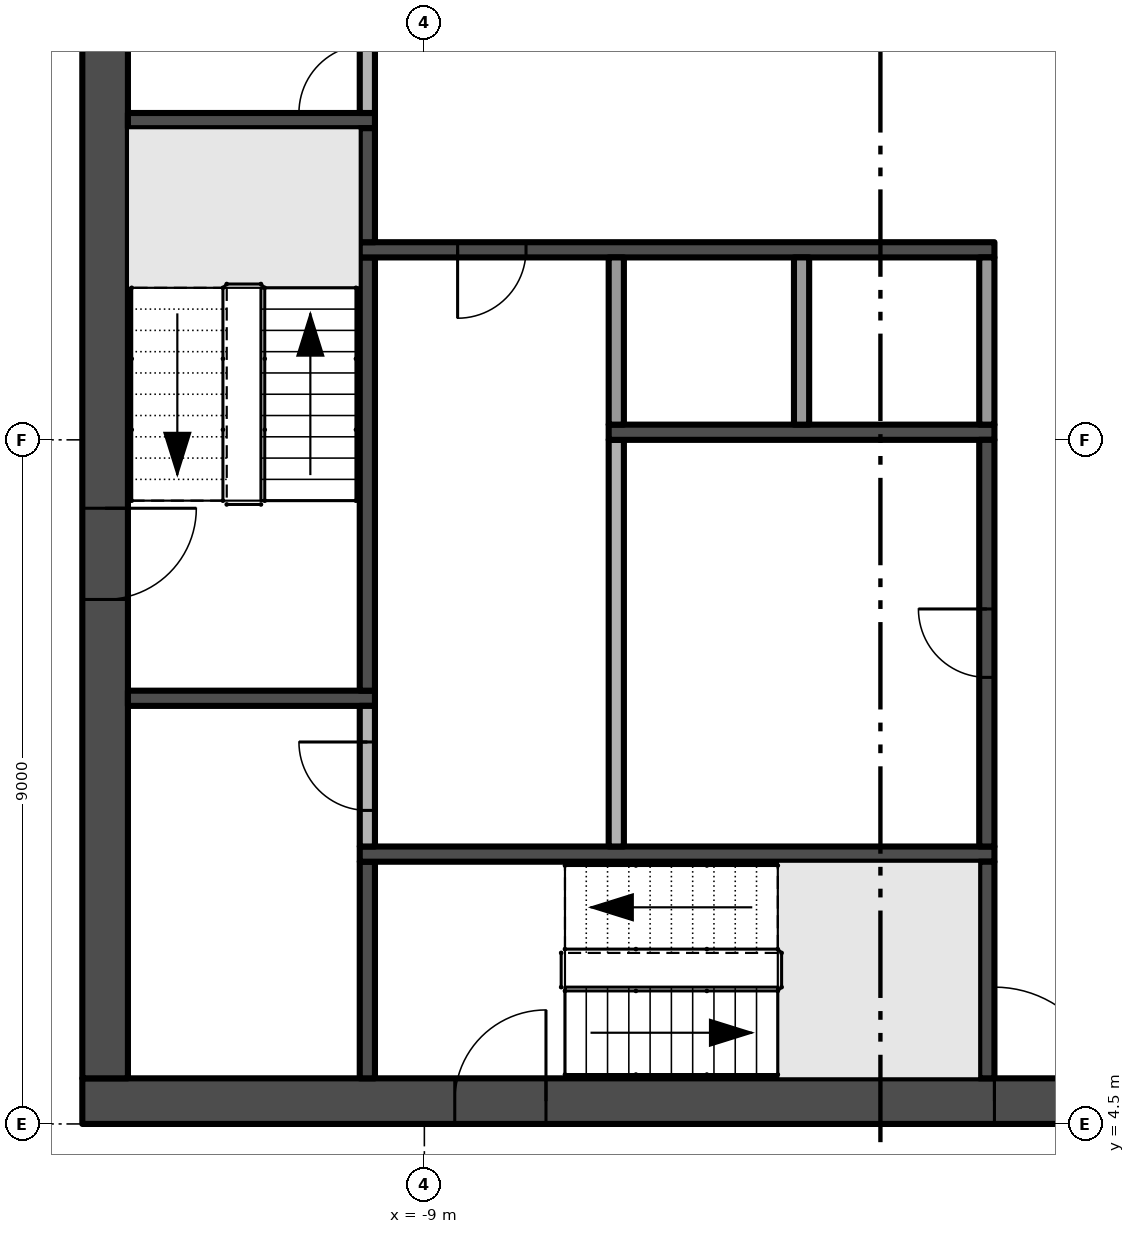
"""IFC4 building model, lengths in metres.
Left out: names, types, materials, properties, quantities, classifications, styles, units other than length and angle.
Written with IfcOpenShell. Run it as: python <this file> out.ifc"""

import sys

from ifc_helpers import new_model, si_unit, direction, frame, frame_2d, origin, place, context, subcontext, project, spatial, rectangle, extrude, element, fill, save


model = new_model("IFC4")
c1 = context("Model", 3, precision=1e-05, world=origin(), true_north=direction((0.0, 1.0)))
c2 = subcontext(c1, "Body", "Model", "MODEL_VIEW")
j1 = project(units=[si_unit("LENGTHUNIT", "METRE"), si_unit("PLANEANGLEUNIT", "RADIAN")], contexts=[c1])
p1 = place(None, origin())
s1 = spatial("IfcSite", under=j1, at=p1, CompositionType="ELEMENT")
p2 = place(p1, origin())
s2 = spatial("IfcBuilding", under=s1, at=p2, CompositionType="ELEMENT")
p3 = place(p2, frame((0.0, 0.0, 222.4)))
s3 = spatial("IfcBuildingStorey", under=s2, at=p3, CompositionType="ELEMENT", Elevation=222.4)
p4 = place(p3, frame((-13.5, 4.8, -0.3), z_axis=(0.0, 0.0, 1.0), x_axis=(1.0, 0.0, 0.0)))
e1 = element("IfcWall", 1, at=p4, inside=s3, PredefinedType="SHEAR", context=c2, shape_type="SweptSolid", body=[
    extrude(rectangle(XDim=27.0, YDim=0.6, at=frame_2d((13.5, 0.0))), origin(), (0.0, 0.0, 1.0), 3.8),
])
p5 = place(p4, frame((12.0, 0.0, 0.3)))
e2 = element("IfcOpeningElement", 2, at=p5, cuts=e1, PredefinedType="OPENING", context=c2, shape_type="SweptSolid", body=[
    extrude(rectangle(XDim=3.0, YDim=2.4, at=frame_2d((1.5, 1.2))), frame((0.0, 0.31, 0.0), z_axis=(0.0, -1.0, 0.0), x_axis=(1.0, 0.0, 0.0)), (0.0, 0.0, 1.0), 0.62),
])
p6 = place(p4, frame((4.9, 0.0, 0.3)))
e3 = element("IfcOpeningElement", 3, at=p6, cuts=e1, PredefinedType="OPENING", context=c2, shape_type="SweptSolid", body=[
    extrude(rectangle(XDim=1.2, YDim=2.2, at=frame_2d((0.6, 1.1))), frame((0.0, 0.31, 0.0), z_axis=(0.0, -1.0, 0.0), x_axis=(1.0, 0.0, 0.0)), (0.0, 0.0, 1.0), 0.62),
])
p7 = place(p4, frame((20.75, 0.0, 0.3)))
e4 = element("IfcOpeningElement", 4, at=p7, cuts=e1, PredefinedType="OPENING", context=c2, shape_type="SweptSolid", body=[
    extrude(rectangle(XDim=1.5, YDim=2.2, at=frame_2d((0.75, 1.1))), frame((0.0, 0.31, 0.0), z_axis=(0.0, -1.0, 0.0), x_axis=(1.0, 0.0, 0.0)), (0.0, 0.0, 1.0), 0.62),
])
p8 = place(p4, frame((17.4, 0.0, 0.3)))
e5 = element("IfcOpeningElement", 5, at=p8, cuts=e1, PredefinedType="OPENING", context=c2, shape_type="SweptSolid", body=[
    extrude(rectangle(XDim=1.2, YDim=2.2, at=frame_2d((0.6, 1.1))), frame((0.0, 0.31, 0.0), z_axis=(0.0, -1.0, 0.0), x_axis=(1.0, 0.0, 0.0)), (0.0, 0.0, 1.0), 0.62),
])
p9 = place(p3, frame((-13.2, 21.9, -0.3), z_axis=(0.0, 0.0, 1.0), x_axis=(0.0, -1.0, 0.0)))
e6 = element("IfcWall", 6, at=p9, inside=s3, PredefinedType="SHEAR", context=c2, shape_type="SweptSolid", body=[
    extrude(rectangle(XDim=16.8, YDim=0.6, at=frame_2d((8.4, 0.0))), origin(), (0.0, 0.0, 1.0), 3.8),
])
p10 = place(p9, frame((9.3, 0.0, 0.3)))
e7 = element("IfcOpeningElement", 7, at=p10, cuts=e6, PredefinedType="OPENING", context=c2, shape_type="SweptSolid", body=[
    extrude(rectangle(XDim=1.2, YDim=2.2, at=frame_2d((0.6, 1.1))), frame((0.0, 0.31, 0.0), z_axis=(0.0, -1.0, 0.0), x_axis=(1.0, 0.0, 0.0)), (0.0, 0.0, 1.0), 0.62),
])
for number, where, z_axis, x_axis in (
    (8, (-12.9, 10.1, 0.0), (0.0, 0.0, 1.0), (1.0, 0.0, 0.0)),
    (9, (-12.9, 17.7, 0.0), (0.0, 0.0, 1.0), (1.0, 0.0, 0.0)),
):
    element("IfcWall", number, at=place(p3, frame(where, z_axis=z_axis, x_axis=x_axis)), inside=s3, PredefinedType="SHEAR", context=c2, shape_type="SweptSolid", body=[
        extrude(rectangle(XDim=3.25, YDim=0.2, at=frame_2d((1.625, 0.0))), origin(), (0.0, 0.0, 1.0), 3.5),
    ])
p11 = place(p3, frame((-9.75, 5.1, 0.0), z_axis=(0.0, 0.0, 1.0), x_axis=(0.0, 1.0, 0.0)))
e10 = element("IfcWall", 10, at=p11, inside=s3, PredefinedType="SHEAR", context=c2, shape_type="SweptSolid", body=[
    extrude(rectangle(XDim=2.85, YDim=0.2, at=frame_2d((1.425, 0.0))), origin(), (0.0, 0.0, 1.0), 3.5),
])
p12 = place(p3, frame((-9.85, 8.05, 0.0), z_axis=(0.0, 0.0, 1.0), x_axis=(1.0, 0.0, 0.0)))
e11 = element("IfcWall", 11, at=p12, inside=s3, PredefinedType="SHEAR", context=c2, shape_type="SweptSolid", body=[
    extrude(rectangle(XDim=8.35, YDim=0.2, at=frame_2d((4.175, 0.0))), origin(), (0.0, 0.0, 1.0), 3.5),
])
p13 = place(p3, frame((-9.75, 8.15, 0.0), z_axis=(0.0, 0.0, 1.0), x_axis=(0.0, 1.0, 0.0)))
e12 = element("IfcWall", 12, at=p13, inside=s3, PredefinedType="PARTITIONING", context=c2, shape_type="SweptSolid", body=[
    extrude(rectangle(XDim=1.85, YDim=0.2, at=frame_2d((0.925, 0.0))), origin(), (0.0, 0.0, 1.0), 3.5),
])
p14 = place(p13, frame((0.475, 0.0, 0.0)))
e13 = element("IfcOpeningElement", 13, at=p14, cuts=e12, PredefinedType="OPENING", context=c2, shape_type="SweptSolid", body=[
    extrude(rectangle(XDim=0.9, YDim=2.1, at=frame_2d((0.45, 1.05))), frame((0.0, 0.11, 0.0), z_axis=(0.0, -1.0, 0.0), x_axis=(1.0, 0.0, 0.0)), (0.0, 0.0, 1.0), 0.22),
])
p15 = place(p3, frame((-9.75, 10.2, 0.0), z_axis=(0.0, 0.0, 1.0), x_axis=(0.0, 1.0, 0.0)))
e14 = element("IfcWall", 14, at=p15, inside=s3, PredefinedType="SHEAR", context=c2, shape_type="SweptSolid", body=[
    extrude(rectangle(XDim=5.7, YDim=0.2, at=frame_2d((2.85, 0.0))), origin(), (0.0, 0.0, 1.0), 3.5),
])
p16 = place(p3, frame((-1.5, 16.0, 0.0), z_axis=(0.0, 0.0, 1.0), x_axis=(-1.0, 0.0, 0.0)))
e15 = element("IfcWall", 15, at=p16, inside=s3, PredefinedType="SHEAR", context=c2, shape_type="SweptSolid", body=[
    extrude(rectangle(XDim=8.35, YDim=0.2, at=frame_2d((4.175, 0.0))), origin(), (0.0, 0.0, 1.0), 3.5),
])
p17 = place(p16, frame((6.162, 0.0, 0.0)))
e16 = element("IfcOpeningElement", 16, at=p17, cuts=e15, PredefinedType="OPENING", context=c2, shape_type="SweptSolid", body=[
    extrude(rectangle(XDim=0.9, YDim=2.1, at=frame_2d((0.45, 1.05))), frame((0.0, 0.11, 0.0), z_axis=(0.0, -1.0, 0.0), x_axis=(1.0, 0.0, 0.0)), (0.0, 0.0, 1.0), 0.22),
])
p18 = place(p3, frame((-9.75, 16.1, 0.0), z_axis=(0.0, 0.0, 1.0), x_axis=(0.0, 1.0, 0.0)))
e17 = element("IfcWall", 17, at=p18, inside=s3, PredefinedType="SHEAR", context=c2, shape_type="SweptSolid", body=[
    extrude(rectangle(XDim=1.5, YDim=0.2, at=frame_2d((0.75, 0.0))), origin(), (0.0, 0.0, 1.0), 3.5),
])
p19 = place(p3, frame((-9.75, 17.8, 0.0), z_axis=(0.0, 0.0, 1.0), x_axis=(0.0, 1.0, 0.0)))
e18 = element("IfcWall", 18, at=p19, inside=s3, PredefinedType="PARTITIONING", context=c2, shape_type="SweptSolid", body=[
    extrude(rectangle(XDim=1.4, YDim=0.2, at=frame_2d((0.7, 0.0))), origin(), (0.0, 0.0, 1.0), 3.5),
])
p20 = place(p19, origin())
e19 = element("IfcOpeningElement", 19, at=p20, cuts=e18, PredefinedType="OPENING", context=c2, shape_type="SweptSolid", body=[
    extrude(rectangle(XDim=0.9, YDim=2.1, at=frame_2d((0.45, 1.05))), frame((0.0, 0.11, 0.0), z_axis=(0.0, -1.0, 0.0), x_axis=(1.0, 0.0, 0.0)), (0.0, 0.0, 1.0), 0.22),
])
p21 = place(p3, frame((-6.475, 8.15, 0.0), z_axis=(0.0, 0.0, 1.0), x_axis=(0.0, 1.0, 0.0)))
e20 = element("IfcWall", 20, at=p21, inside=s3, PredefinedType="PARTITIONING", context=c2, shape_type="SweptSolid", body=[
    extrude(rectangle(XDim=5.35, YDim=0.2, at=frame_2d((2.675, 0.0))), origin(), (0.0, 0.0, 1.0), 3.5),
])
p22 = place(p3, frame((-6.575, 13.6, 0.0), z_axis=(0.0, 0.0, 1.0), x_axis=(1.0, 0.0, 0.0)))
e21 = element("IfcWall", 21, at=p22, inside=s3, PredefinedType="SHEAR", context=c2, shape_type="SweptSolid", body=[
    extrude(rectangle(XDim=5.075, YDim=0.2, at=frame_2d((2.538, 0.0))), origin(), (0.0, 0.0, 1.0), 3.5),
])
for number, where, z_axis, x_axis in (
    (22, (-6.475, 13.7, 0.0), (0.0, 0.0, 1.0), (0.0, 1.0, 0.0)),
    (23, (-4.037, 13.7, 0.0), (0.0, 0.0, 1.0), (0.0, 1.0, 0.0)),
):
    element("IfcWall", number, at=place(p3, frame(where, z_axis=z_axis, x_axis=x_axis)), inside=s3, PredefinedType="PARTITIONING", context=c2, shape_type="SweptSolid", body=[
        extrude(rectangle(XDim=2.2, YDim=0.2, at=frame_2d((1.1, 0.0))), origin(), (0.0, 0.0, 1.0), 3.5),
    ])
p23 = place(p3, frame((-1.6, 5.1, 0.0), z_axis=(0.0, 0.0, 1.0), x_axis=(0.0, 1.0, 0.0)))
e24 = element("IfcWall", 24, at=p23, inside=s3, PredefinedType="SHEAR", context=c2, shape_type="SweptSolid", body=[
    extrude(rectangle(XDim=2.85, YDim=0.2, at=frame_2d((1.425, 0.0))), origin(), (0.0, 0.0, 1.0), 3.5),
])
p24 = place(p3, frame((-1.6, 8.15, 0.0), z_axis=(0.0, 0.0, 1.0), x_axis=(0.0, 1.0, 0.0)))
e25 = element("IfcWall", 25, at=p24, inside=s3, PredefinedType="SHEAR", context=c2, shape_type="SweptSolid", body=[
    extrude(rectangle(XDim=5.35, YDim=0.2, at=frame_2d((2.675, 0.0))), origin(), (0.0, 0.0, 1.0), 3.5),
])
p25 = place(p24, frame((2.225, 0.0, 0.0)))
e26 = element("IfcOpeningElement", 26, at=p25, cuts=e25, PredefinedType="OPENING", context=c2, shape_type="SweptSolid", body=[
    extrude(rectangle(XDim=0.9, YDim=2.1, at=frame_2d((0.45, 1.05))), frame((0.0, 0.11, 0.0), z_axis=(0.0, -1.0, 0.0), x_axis=(1.0, 0.0, 0.0)), (0.0, 0.0, 1.0), 0.22),
])
p26 = place(p3, frame((-1.6, 13.7, 0.0), z_axis=(0.0, 0.0, 1.0), x_axis=(0.0, 1.0, 0.0)))
e27 = element("IfcWall", 27, at=p26, inside=s3, PredefinedType="PARTITIONING", context=c2, shape_type="SweptSolid", body=[
    extrude(rectangle(XDim=2.2, YDim=0.2, at=frame_2d((1.1, 0.0))), origin(), (0.0, 0.0, 1.0), 3.5),
])
p27 = place(p5, frame((3.0, 0.0, 0.0), z_axis=(0.0, 0.0, 1.0), x_axis=(-1.0, 0.0, 0.0)))
e28 = element("IfcDoor", 28, at=p27, inside=s3, OperationType="DOUBLE_DOOR_SINGLE_SWING", PredefinedType="DOOR", context=c2, shape_type="SweptSolid", body=[
    extrude(rectangle(XDim=3.0, YDim=2.4, at=frame_2d((1.5, 1.2))), frame((0.0, 0.025, 0.0), z_axis=(0.0, -1.0, 0.0), x_axis=(1.0, 0.0, 0.0)), (0.0, 0.0, 1.0), 0.05),
])
fill(e2, e28)
p28 = place(p10, frame((1.2, 0.0, 0.0), z_axis=(0.0, 0.0, 1.0), x_axis=(-1.0, 0.0, 0.0)))
e29 = element("IfcDoor", 29, at=p28, inside=s3, OperationType="SINGLE_SWING_RIGHT", PredefinedType="DOOR", context=c2, shape_type="SweptSolid", body=[
    extrude(rectangle(XDim=1.2, YDim=2.2, at=frame_2d((0.6, 1.1))), frame((0.0, 0.025, 0.0), z_axis=(0.0, -1.0, 0.0), x_axis=(1.0, 0.0, 0.0)), (0.0, 0.0, 1.0), 0.05),
])
fill(e7, e29)
p29 = place(p6, frame((1.2, 0.0, 0.0), z_axis=(0.0, 0.0, 1.0), x_axis=(-1.0, 0.0, 0.0)))
e30 = element("IfcDoor", 30, at=p29, inside=s3, OperationType="SINGLE_SWING_LEFT", PredefinedType="DOOR", context=c2, shape_type="SweptSolid", body=[
    extrude(rectangle(XDim=1.2, YDim=2.2, at=frame_2d((0.6, 1.1))), frame((0.0, 0.025, 0.0), z_axis=(0.0, -1.0, 0.0), x_axis=(1.0, 0.0, 0.0)), (0.0, 0.0, 1.0), 0.05),
])
fill(e3, e30)
p30 = place(p17, origin())
e31 = element("IfcDoor", 31, at=p30, inside=s3, OperationType="SINGLE_SWING_RIGHT", PredefinedType="DOOR", context=c2, shape_type="SweptSolid", body=[
    extrude(rectangle(XDim=0.9, YDim=2.1, at=frame_2d((0.45, 1.05))), frame((0.0, 0.025, 0.0), z_axis=(0.0, -1.0, 0.0), x_axis=(1.0, 0.0, 0.0)), (0.0, 0.0, 1.0), 0.05),
])
fill(e16, e31)
p31 = place(p25, origin())
e32 = element("IfcDoor", 32, at=p31, inside=s3, OperationType="SINGLE_SWING_RIGHT", PredefinedType="DOOR", context=c2, shape_type="SweptSolid", body=[
    extrude(rectangle(XDim=0.9, YDim=2.1, at=frame_2d((0.45, 1.05))), frame((0.0, 0.025, 0.0), z_axis=(0.0, -1.0, 0.0), x_axis=(1.0, 0.0, 0.0)), (0.0, 0.0, 1.0), 0.05),
])
fill(e26, e32)
p32 = place(p20, origin())
e33 = element("IfcDoor", 33, at=p32, inside=s3, OperationType="SINGLE_SWING_LEFT", PredefinedType="DOOR", context=c2, shape_type="SweptSolid", body=[
    extrude(rectangle(XDim=0.9, YDim=2.1, at=frame_2d((0.45, 1.05))), frame((0.0, 0.025, 0.0), z_axis=(0.0, -1.0, 0.0), x_axis=(1.0, 0.0, 0.0)), (0.0, 0.0, 1.0), 0.05),
])
fill(e19, e33)
p33 = place(p14, origin())
e34 = element("IfcDoor", 34, at=p33, inside=s3, OperationType="SINGLE_SWING_RIGHT", PredefinedType="DOOR", context=c2, shape_type="SweptSolid", body=[
    extrude(rectangle(XDim=0.9, YDim=2.1, at=frame_2d((0.45, 1.05))), frame((0.0, 0.025, 0.0), z_axis=(0.0, -1.0, 0.0), x_axis=(1.0, 0.0, 0.0)), (0.0, 0.0, 1.0), 0.05),
])
fill(e13, e34)
save(model, sys.argv[1])
